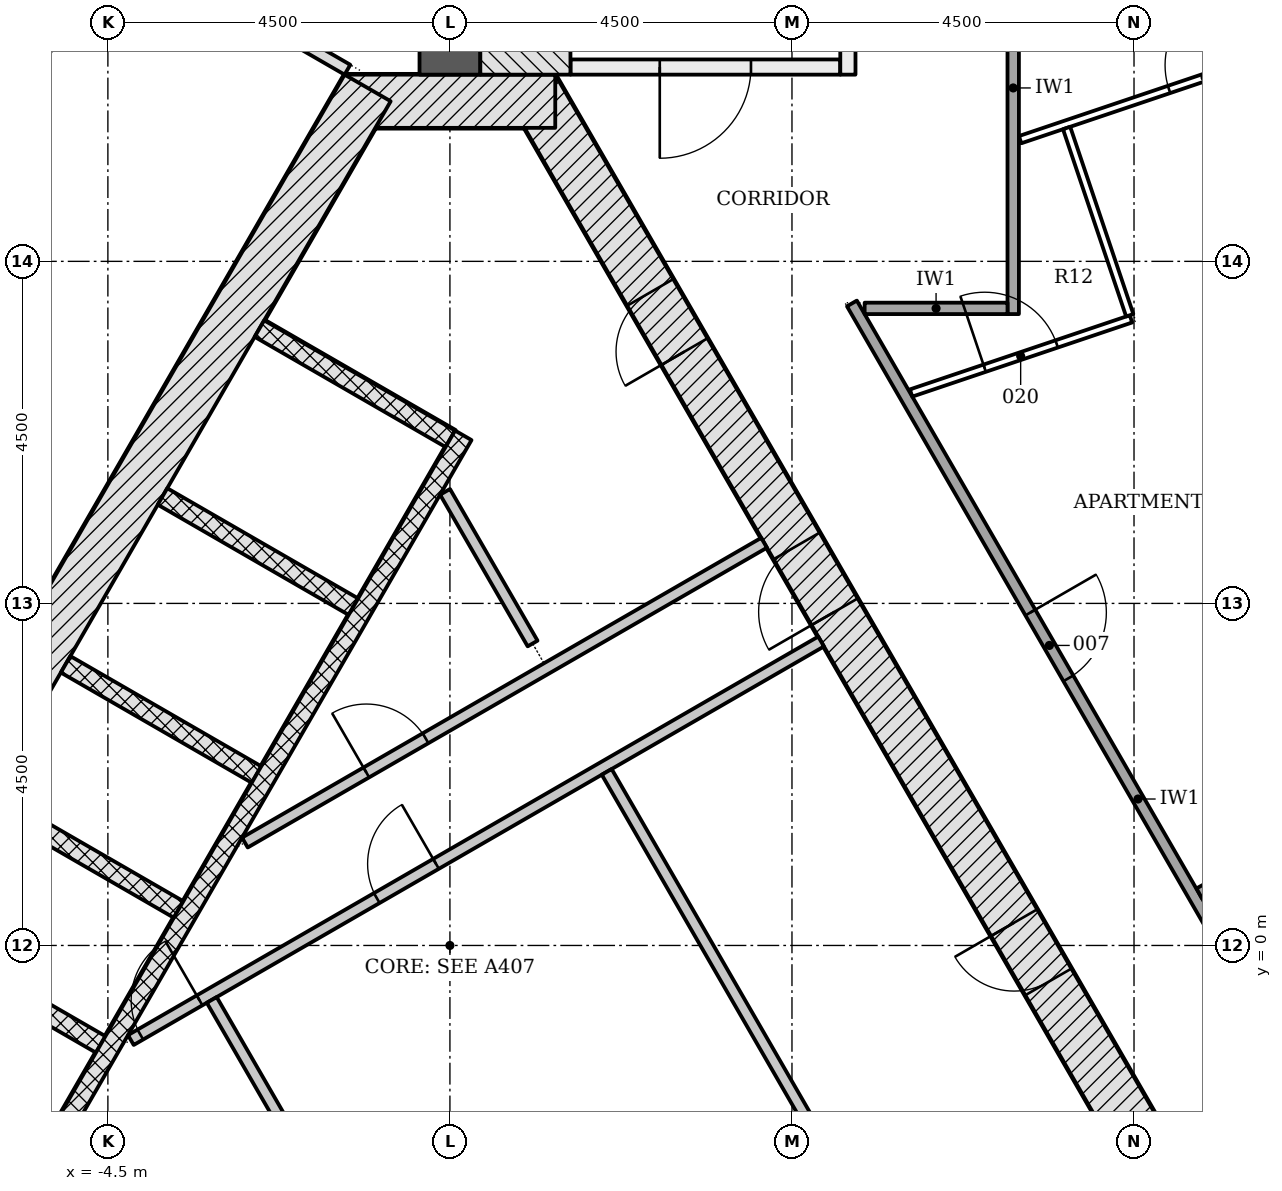
"""IFC4 building model, lengths in metres.
Left out: names, types, materials, properties, quantities, classifications, styles, units other than length and angle.
Written with IfcOpenShell. Run it as: python <this file> out.ifc"""

import sys

from ifc_helpers import new_model, si_unit, direction, frame, frame_2d, origin, place, context, subcontext, project, spatial, rectangle, extrude, element, fill, save


model = new_model("IFC4")
c1 = context("Model", 3, precision=1e-05, world=origin(), true_north=direction((0.0, 1.0)))
c2 = subcontext(c1, "Body", "Model", "MODEL_VIEW")
j1 = project(units=[si_unit("LENGTHUNIT", "METRE"), si_unit("PLANEANGLEUNIT", "RADIAN")], contexts=[c1])
p1 = place(None, origin())
s1 = spatial("IfcSite", under=j1, at=p1, CompositionType="ELEMENT")
p2 = place(p1, origin())
s2 = spatial("IfcBuilding", under=s1, at=p2, CompositionType="ELEMENT")
p3 = place(p2, frame((0.0, 0.0, 109.5)))
s3 = spatial("IfcBuildingStorey", under=s2, at=p3, CompositionType="ELEMENT", Elevation=109.5)
p4 = place(p3, frame((10.311, -4.703, -0.2), z_axis=(0.0, 0.0, 1.0), x_axis=(-0.500001446645, 0.866024568562, 0.0)))
e1 = element("IfcWall", 1, at=p4, inside=s3, PredefinedType="SHEAR", context=c2, shape_type="SweptSolid", body=[
    extrude(rectangle(XDim=18.458, YDim=0.7, at=frame_2d((9.229, 0.0))), origin(), (0.0, 0.0, 1.0), 3.6),
])
p5 = place(p4, frame((10.5, 0.0, 0.2)))
e2 = element("IfcOpeningElement", 2, at=p5, cuts=e1, PredefinedType="OPENING", context=c2, shape_type="SweptSolid", body=[
    extrude(rectangle(XDim=1.0, YDim=2.1, at=frame_2d((0.5, 1.05))), frame((0.0, 0.36, 0.0), z_axis=(0.0, -1.0, 0.0), x_axis=(1.0, 0.0, 0.0)), (0.0, 0.0, 1.0), 0.72),
])
p6 = place(p4, frame((4.877, 0.0, 0.2)))
e3 = element("IfcOpeningElement", 3, at=p6, cuts=e1, PredefinedType="OPENING", context=c2, shape_type="SweptSolid", body=[
    extrude(rectangle(XDim=0.9, YDim=2.1, at=frame_2d((0.45, 1.05))), frame((0.0, 0.36, 0.0), z_axis=(0.0, -1.0, 0.0), x_axis=(1.0, 0.0, 0.0)), (0.0, 0.0, 1.0), 0.72),
])
p7 = place(p4, frame((14.452, 0.0, 0.2)))
e4 = element("IfcOpeningElement", 4, at=p7, cuts=e1, PredefinedType="OPENING", context=c2, shape_type="SweptSolid", body=[
    extrude(rectangle(XDim=0.9, YDim=2.1, at=frame_2d((0.45, 1.05))), frame((0.0, 0.36, 0.0), z_axis=(0.0, -1.0, 0.0), x_axis=(1.0, 0.0, 0.0)), (0.0, 0.0, 1.0), 0.72),
])
p8 = place(p3, frame((1.386, 11.106, -0.2), z_axis=(0.0, 0.0, 1.0), x_axis=(-1.0, 0.0, 0.0)))
e5 = element("IfcWall", 5, at=p8, inside=s3, PredefinedType="SHEAR", context=c2, shape_type="SweptSolid", body=[
    extrude(rectangle(XDim=2.771, YDim=0.7, at=frame_2d((1.386, 0.0))), origin(), (0.0, 0.0, 1.0), 3.6),
])
p9 = place(p3, frame((-1.083, 11.281, -0.2), z_axis=(0.0, 0.0, 1.0), x_axis=(-0.500001446645, -0.866024568562, 0.0)))
e6 = element("IfcWall", 6, at=p9, inside=s3, PredefinedType="SHEAR", context=c2, shape_type="SweptSolid", body=[
    extrude(rectangle(XDim=18.458, YDim=0.7, at=frame_2d((9.229, 0.0))), origin(), (0.0, 0.0, 1.0), 3.6),
])
p10 = place(p9, frame((8.979, 0.0, 0.2)))
e7 = element("IfcOpeningElement", 7, at=p10, cuts=e6, PredefinedType="OPENING", context=c2, shape_type="SweptSolid", body=[
    extrude(rectangle(XDim=1.2, YDim=2.1, at=frame_2d((0.6, 1.05))), frame((0.0, 0.36, 0.0), z_axis=(0.0, -1.0, 0.0), x_axis=(1.0, 0.0, 0.0)), (0.0, 0.0, 1.0), 0.72),
])
p11 = place(p9, frame((11.029, 0.0, 0.2)))
e8 = element("IfcOpeningElement", 8, at=p11, cuts=e6, PredefinedType="OPENING", context=c2, shape_type="SweptSolid", body=[
    extrude(rectangle(XDim=1.2, YDim=2.1, at=frame_2d((0.6, 1.05))), frame((0.0, 0.36, 0.0), z_axis=(0.0, -1.0, 0.0), x_axis=(1.0, 0.0, 0.0)), (0.0, 0.0, 1.0), 0.72),
])
p12 = place(p3, frame((0.0, 11.456, -0.2), z_axis=(0.0, 0.0, 1.0), x_axis=(0.0, 1.0, 0.0)))
e9 = element("IfcWall", 9, at=p12, inside=s3, PredefinedType="SHEAR", context=c2, shape_type="SweptSolid", body=[
    extrude(rectangle(XDim=11.919, YDim=0.8, at=frame_2d((5.959, 0.0))), origin(), (0.0, 0.0, 1.0), 3.6),
])
p13 = place(p3, frame((-2.506, 8.115, -0.2), z_axis=(0.0, 0.0, 1.0), x_axis=(0.865996321171, -0.50005036918, 0.0)))
e10 = element("IfcWall", 10, at=p13, inside=s3, PredefinedType="PARTITIONING", context=c2, shape_type="SweptSolid", body=[
    extrude(rectangle(XDim=2.9, YDim=0.25, at=frame_2d((1.45, 0.0))), origin(), (0.0, 0.0, 1.0), 3.6),
])
for number, where, z_axis, x_axis in (
    (11, (-3.781, 5.907, -0.2), (0.0, 0.0, 1.0), (0.866, -0.5, 0.0)),
    (12, (-5.056, 3.699, -0.2), (0.0, 0.0, 1.0), (0.866, -0.5, 0.0)),
    (13, (-6.081, 1.923, -0.2), (0.0, 0.0, 1.0), (0.866, -0.5, 0.0)),
    (14, (-7.106, 0.148, -0.2), (0.0, 0.0, 1.0), (0.866, -0.5, 0.0)),
):
    element("IfcWall", number, at=place(p3, frame(where, z_axis=z_axis, x_axis=x_axis)), inside=s3, PredefinedType="PARTITIONING", context=c2, shape_type="SweptSolid", body=[
        extrude(rectangle(XDim=2.9, YDim=0.25, at=frame_2d((1.45, 0.0))), origin(), (0.0, 0.0, 1.0), 3.6),
    ])
p14 = place(p3, frame((0.176, 6.711, 0.0), z_axis=(0.0, 0.0, 1.0), x_axis=(-0.500004227369, -0.866022963098, 0.0)))
e15 = element("IfcWall", 15, at=p14, inside=s3, PredefinedType="PARTITIONING", context=c2, shape_type="SweptSolid", body=[
    extrude(rectangle(XDim=11.8, YDim=0.25, at=frame_2d((5.9, 0.0))), origin(), (0.0, 0.0, 1.0), 3.4),
])
p15 = place(p3, frame((-4.198, -1.244, 0.0), z_axis=(0.0, 0.0, 1.0), x_axis=(0.866020798945, 0.500007975732, 0.0)))
e16 = element("IfcWall", 16, at=p15, inside=s3, PredefinedType="PARTITIONING", context=c2, shape_type="SweptSolid", body=[
    extrude(rectangle(XDim=10.486, YDim=0.15, at=frame_2d((5.243, 0.0))), origin(), (0.0, 0.0, 1.0), 3.4),
])
p16 = place(p15, frame((3.736, 0.0, 0.0)))
e17 = element("IfcOpeningElement", 17, at=p16, cuts=e16, PredefinedType="OPENING", context=c2, shape_type="SweptSolid", body=[
    extrude(rectangle(XDim=0.9, YDim=2.1, at=frame_2d((0.45, 1.05))), frame((0.0, 0.085, 0.0), z_axis=(0.0, -1.0, 0.0), x_axis=(1.0, 0.0, 0.0)), (0.0, 0.0, 1.0), 0.17),
])
p17 = place(p15, frame((0.144, 0.0, 0.0)))
e18 = element("IfcOpeningElement", 18, at=p17, cuts=e16, PredefinedType="OPENING", context=c2, shape_type="SweptSolid", body=[
    extrude(rectangle(XDim=0.9, YDim=2.1, at=frame_2d((0.45, 1.05))), frame((0.0, 0.085, 0.0), z_axis=(0.0, -1.0, 0.0), x_axis=(1.0, 0.0, 0.0)), (0.0, 0.0, 1.0), 0.17),
])
p18 = place(p3, frame((5.367, -3.439, 0.0), z_axis=(0.0, 0.0, 1.0), x_axis=(-0.499981499682, 0.866036084685, 0.0)))
e19 = element("IfcWall", 19, at=p18, inside=s3, PredefinedType="PARTITIONING", context=c2, shape_type="SweptSolid", body=[
    extrude(rectangle(XDim=6.608, YDim=0.15, at=frame_2d((3.304, 0.0))), origin(), (0.0, 0.0, 1.0), 3.4),
])
p19 = place(p3, frame((-1.561, -3.439, 0.0), z_axis=(0.0, 0.0, 1.0), x_axis=(-0.499989077369, 0.866031709877, 0.0)))
e20 = element("IfcWall", 20, at=p19, inside=s3, PredefinedType="PARTITIONING", context=c2, shape_type="SweptSolid", body=[
    extrude(rectangle(XDim=3.144, YDim=0.15, at=frame_2d((1.572, 0.0))), origin(), (0.0, 0.0, 1.0), 3.4),
])
p20 = place(p3, frame((-2.698, 1.354, 0.0), z_axis=(0.0, 0.0, 1.0), x_axis=(0.866021157486, 0.500007354732, 0.0)))
e21 = element("IfcWall", 21, at=p20, inside=s3, PredefinedType="PARTITIONING", context=c2, shape_type="SweptSolid", body=[
    extrude(rectangle(XDim=7.888, YDim=0.15, at=frame_2d((3.944, 0.0))), origin(), (0.0, 0.0, 1.0), 3.4),
])
p21 = place(p20, frame((1.845, 0.0, 0.0)))
e22 = element("IfcOpeningElement", 22, at=p21, cuts=e21, PredefinedType="OPENING", context=c2, shape_type="SweptSolid", body=[
    extrude(rectangle(XDim=0.9, YDim=2.1, at=frame_2d((0.45, 1.05))), frame((0.0, 0.085, 0.0), z_axis=(0.0, -1.0, 0.0), x_axis=(1.0, 0.0, 0.0)), (0.0, 0.0, 1.0), 0.17),
])
p22 = place(p3, frame((1.088, 3.972, 0.0), z_axis=(0.0, 0.0, 1.0), x_axis=(-0.500116913307, 0.865957893332, 0.0)))
e23 = element("IfcWall", 23, at=p22, inside=s3, PredefinedType="PARTITIONING", context=c2, shape_type="SweptSolid", body=[
    extrude(rectangle(XDim=2.304, YDim=0.15, at=frame_2d((1.152, 0.0))), origin(), (0.0, 0.0, 1.0), 3.4),
])
p23 = place(p3, frame((5.135, 11.556, -0.2), z_axis=(0.0, 0.0, 1.0), x_axis=(-1.0, 0.0, 0.0)))
e24 = element("IfcWall", 24, at=p23, inside=s3, PredefinedType="SHEAR", context=c2, shape_type="SweptSolid", body=[
    extrude(rectangle(XDim=3.55, YDim=0.2, at=frame_2d((1.775, 0.0))), origin(), (0.0, 0.0, 1.0), 3.6),
])
p24 = place(p23, frame((1.175, 0.0, 0.2)))
e25 = element("IfcOpeningElement", 25, at=p24, cuts=e24, PredefinedType="OPENING", context=c2, shape_type="SweptSolid", body=[
    extrude(rectangle(XDim=1.2, YDim=2.1, at=frame_2d((0.6, 1.05))), frame((0.0, 0.11, 0.0), z_axis=(0.0, -1.0, 0.0), x_axis=(1.0, 0.0, 0.0)), (0.0, 0.0, 1.0), 0.22),
])
p25 = place(p3, frame((5.236, 11.456, -0.2), z_axis=(0.0, 0.0, 1.0), x_axis=(0.0, 1.0, 0.0)))
e26 = element("IfcWall", 26, at=p25, inside=s3, PredefinedType="SHEAR", context=c2, shape_type="SweptSolid", body=[
    extrude(rectangle(XDim=5.6, YDim=0.2, at=frame_2d((2.8, 0.0))), origin(), (0.0, 0.0, 1.0), 3.6),
])
p26 = place(p25, frame((0.45, 0.0, 0.2)))
e27 = element("IfcOpeningElement", 27, at=p26, cuts=e26, PredefinedType="OPENING", context=c2, shape_type="SweptSolid", body=[
    extrude(rectangle(XDim=1.2, YDim=2.1, at=frame_2d((0.6, 1.05))), frame((0.0, 0.11, 0.0), z_axis=(0.0, -1.0, 0.0), x_axis=(1.0, 0.0, 0.0)), (0.0, 0.0, 1.0), 0.22),
])
p27 = place(p3, frame((0.993, 11.456, -0.2), z_axis=(0.0, 0.0, 1.0), x_axis=(0.0, 1.0, 0.0)))
e28 = element("IfcWall", 28, at=p27, inside=s3, PredefinedType="SHEAR", context=c2, shape_type="SweptSolid", body=[
    extrude(rectangle(XDim=7.2, YDim=1.186, at=frame_2d((3.6, 0.0))), origin(), (0.0, 0.0, 1.0), 3.6),
])
p28 = place(p3, frame((-16.169, -3.099, 0.0), z_axis=(0.0, 0.0, 1.0), x_axis=(0.499999805269, 0.866025516212, 0.0)))
e29 = element("IfcWall", 29, at=p28, inside=s3, PredefinedType="PARTITIONING", context=c2, shape_type="SweptSolid", body=[
    extrude(rectangle(XDim=22.097, YDim=0.15, at=frame_2d((11.049, 0.0))), origin(), (0.0, 0.0, 1.0), 2.847),
])
p29 = place(p28, frame((17.776, 0.0, 0.0)))
e30 = element("IfcOpeningElement", 30, at=p29, cuts=e29, PredefinedType="OPENING", context=c2, shape_type="SweptSolid", body=[
    extrude(rectangle(XDim=1.0, YDim=2.1, at=frame_2d((0.5, 1.05))), frame((0.0, 0.085, 0.0), z_axis=(0.0, -1.0, 0.0), x_axis=(1.0, 0.0, 0.0)), (0.0, 0.0, 1.0), 0.17),
])
p30 = place(p28, frame((15.186, 0.0, 0.0)))
e31 = element("IfcOpeningElement", 31, at=p30, cuts=e29, PredefinedType="OPENING", context=c2, shape_type="SweptSolid", body=[
    extrude(rectangle(XDim=1.0, YDim=2.1, at=frame_2d((0.5, 1.05))), frame((0.0, 0.085, 0.0), z_axis=(0.0, -1.0, 0.0), x_axis=(1.0, 0.0, 0.0)), (0.0, 0.0, 1.0), 0.17),
])
p31 = place(p28, frame((11.84, 0.0, 0.0)))
e32 = element("IfcOpeningElement", 32, at=p31, cuts=e29, PredefinedType="OPENING", context=c2, shape_type="SweptSolid", body=[
    extrude(rectangle(XDim=1.5, YDim=2.1, at=frame_2d((0.75, 1.05))), frame((0.0, 0.085, 0.0), z_axis=(0.0, -1.0, 0.0), x_axis=(1.0, 0.0, 0.0)), (0.0, 0.0, 1.0), 0.17),
])
p32 = place(p28, frame((4.503, 0.0, 0.0)))
e33 = element("IfcOpeningElement", 33, at=p32, cuts=e29, PredefinedType="OPENING", context=c2, shape_type="SweptSolid", body=[
    extrude(rectangle(XDim=1.5, YDim=2.1, at=frame_2d((0.75, 1.05))), frame((0.0, 0.085, 0.0), z_axis=(0.0, -1.0, 0.0), x_axis=(1.0, 0.0, 0.0)), (0.0, 0.0, 1.0), 0.17),
])
p33 = place(p3, frame((-4.407, 13.374, 0.0), z_axis=(0.0, 0.0, 1.0), x_axis=(-0.499997181693, -0.866027030928, 0.0)))
e34 = element("IfcWall", 34, at=p33, inside=s3, PredefinedType="PARTITIONING", context=c2, shape_type="SweptSolid", body=[
    extrude(rectangle(XDim=16.77, YDim=0.15, at=frame_2d((8.385, 0.0))), origin(), (0.0, 0.0, 1.0), 2.847),
])
p34 = place(p33, frame((8.879, 0.0, 0.0)))
e35 = element("IfcOpeningElement", 35, at=p34, cuts=e34, PredefinedType="OPENING", context=c2, shape_type="SweptSolid", body=[
    extrude(rectangle(XDim=1.0, YDim=2.1, at=frame_2d((0.5, 1.05))), frame((0.0, 0.085, 0.0), z_axis=(0.0, -1.0, 0.0), x_axis=(1.0, 0.0, 0.0)), (0.0, 0.0, 1.0), 0.17),
])
p35 = place(p3, frame((5.289, 8.446, 0.0), z_axis=(0.0, 0.0, 1.0), x_axis=(0.499996620721, -0.866027354803, 0.0)))
e36 = element("IfcWall", 36, at=p35, inside=s3, PredefinedType="PARTITIONING", context=c2, shape_type="SweptSolid", body=[
    extrude(rectangle(XDim=15.057, YDim=0.15, at=frame_2d((7.528, 0.0))), origin(), (0.0, 0.0, 1.0), 2.847),
])
p36 = place(p35, frame((10.689, 0.0, 0.0)))
e37 = element("IfcOpeningElement", 37, at=p36, cuts=e36, PredefinedType="OPENING", context=c2, shape_type="SweptSolid", body=[
    extrude(rectangle(XDim=1.0, YDim=2.1, at=frame_2d((0.5, 1.05))), frame((0.0, 0.085, 0.0), z_axis=(0.0, -1.0, 0.0), x_axis=(1.0, 0.0, 0.0)), (0.0, 0.0, 1.0), 0.17),
])
p37 = place(p35, frame((4.695, 0.0, 0.0)))
e38 = element("IfcOpeningElement", 38, at=p37, cuts=e36, PredefinedType="OPENING", context=c2, shape_type="SweptSolid", body=[
    extrude(rectangle(XDim=1.0, YDim=2.1, at=frame_2d((0.5, 1.05))), frame((0.0, 0.085, 0.0), z_axis=(0.0, -1.0, 0.0), x_axis=(1.0, 0.0, 0.0)), (0.0, 0.0, 1.0), 0.17),
])
p38 = place(p3, frame((7.411, 8.306, 0.0), z_axis=(0.0, 0.0, 1.0), x_axis=(0.0, 1.0, 0.0)))
e39 = element("IfcWall", 39, at=p38, inside=s3, PredefinedType="PARTITIONING", context=c2, shape_type="SweptSolid", body=[
    extrude(rectangle(XDim=5.95, YDim=0.15, at=frame_2d((2.975, 0.0))), origin(), (0.0, 0.0, 1.0), 2.847),
])
p39 = place(p3, frame((-4.379, 13.271, 0.0), z_axis=(0.0, 0.0, 1.0), x_axis=(0.866019471182, -0.500010275428, 0.0)))
e40 = element("IfcWall", 40, at=p39, inside=s3, PredefinedType="PARTITIONING", context=c2, shape_type="SweptSolid", body=[
    extrude(rectangle(XDim=3.5, YDim=0.15, at=frame_2d((1.75, 0.0))), origin(), (0.0, 0.0, 1.0), 3.4),
])
p40 = place(p3, frame((5.456, 8.381, 0.0), z_axis=(0.0, 0.0, 1.0), x_axis=(1.0, 0.0, 0.0)))
e41 = element("IfcWall", 41, at=p40, inside=s3, PredefinedType="PARTITIONING", context=c2, shape_type="SweptSolid", body=[
    extrude(rectangle(XDim=1.88, YDim=0.15, at=frame_2d((0.94, 0.0))), origin(), (0.0, 0.0, 1.0), 2.847),
])
p41 = place(p3, frame((16.297, 4.232, 0.0), z_axis=(0.0, 0.0, 1.0), x_axis=(-0.875895262359, -0.482501284327, 0.0)))
e42 = element("IfcWall", 42, at=p41, inside=s3, PredefinedType="PARTITIONING", context=c2, shape_type="SweptSolid", body=[
    extrude(rectangle(XDim=7.351, YDim=0.15, at=frame_2d((3.676, 0.0))), origin(), (0.0, 0.0, 1.0), 2.847),
])
p42 = place(p3, frame((7.502, 10.601, 0.0), z_axis=(0.0, 0.0, 1.0), x_axis=(0.947570000993, 0.319548264303, 0.0)))
e43 = element("IfcWall", 43, at=p42, inside=s3, PredefinedType="PARTITIONING", context=c2, shape_type="SweptSolid", body=[
    extrude(rectangle(XDim=4.519, YDim=0.1, at=frame_2d((2.26, 0.0))), origin(), (0.0, 0.0, 1.0), 2.847),
])
p43 = place(p42, frame((2.068, 0.0, 0.0)))
e44 = element("IfcOpeningElement", 44, at=p43, cuts=e43, PredefinedType="OPENING", context=c2, shape_type="SweptSolid", body=[
    extrude(rectangle(XDim=1.0, YDim=2.1, at=frame_2d((0.5, 1.05))), frame((0.0, 0.06, 0.0), z_axis=(0.0, -1.0, 0.0), x_axis=(1.0, 0.0, 0.0)), (0.0, 0.0, 1.0), 0.12),
])
p44 = place(p3, frame((6.067, 7.268, 0.0), z_axis=(0.0, 0.0, 1.0), x_axis=(0.94756585242, 0.319560565978, 0.0)))
e45 = element("IfcWall", 45, at=p44, inside=s3, PredefinedType="PARTITIONING", context=c2, shape_type="SweptSolid", body=[
    extrude(rectangle(XDim=3.053, YDim=0.1, at=frame_2d((1.526, 0.0))), origin(), (0.0, 0.0, 1.0), 3.4),
])
p45 = place(p44, frame((1.021, 0.0, 0.0)))
e46 = element("IfcOpeningElement", 46, at=p45, cuts=e45, PredefinedType="OPENING", context=c2, shape_type="SweptSolid", body=[
    extrude(rectangle(XDim=1.0, YDim=2.1, at=frame_2d((0.5, 1.05))), frame((0.0, 0.06, 0.0), z_axis=(0.0, -1.0, 0.0), x_axis=(1.0, 0.0, 0.0)), (0.0, 0.0, 1.0), 0.12),
])
p46 = place(p3, frame((8.113, 10.754, 0.0), z_axis=(0.0, 0.0, 1.0), x_axis=(0.31954997077, -0.94756942552, 0.0)))
e47 = element("IfcWall", 47, at=p46, inside=s3, PredefinedType="PARTITIONING", context=c2, shape_type="SweptSolid", body=[
    extrude(rectangle(XDim=2.6, YDim=0.1, at=frame_2d((1.3, 0.0))), origin(), (0.0, 0.0, 1.0), 2.847),
])
p47 = place(p5, origin())
e48 = element("IfcDoor", 48, at=p47, inside=s3, OperationType="SINGLE_SWING_LEFT", PredefinedType="DOOR", context=c2, shape_type="SweptSolid", body=[
    extrude(rectangle(XDim=1.0, YDim=2.1, at=frame_2d((0.5, 1.05))), frame((0.0, 0.075, 0.0), z_axis=(0.0, -1.0, 0.0), x_axis=(1.0, 0.0, 0.0)), (0.0, 0.0, 1.0), 0.15),
])
fill(e2, e48)
p48 = place(p6, origin())
e49 = element("IfcDoor", 49, at=p48, inside=s3, OperationType="SINGLE_SWING_RIGHT", PredefinedType="DOOR", context=c2, shape_type="SweptSolid", body=[
    extrude(rectangle(XDim=0.9, YDim=2.1, at=frame_2d((0.45, 1.05))), frame((0.0, 0.075, 0.0), z_axis=(0.0, -1.0, 0.0), x_axis=(1.0, 0.0, 0.0)), (0.0, 0.0, 1.0), 0.15),
])
fill(e3, e49)
p49 = place(p7, origin())
e50 = element("IfcDoor", 50, at=p49, inside=s3, OperationType="SINGLE_SWING_LEFT", PredefinedType="DOOR", context=c2, shape_type="SweptSolid", body=[
    extrude(rectangle(XDim=0.9, YDim=2.1, at=frame_2d((0.45, 1.05))), frame((0.0, 0.075, 0.0), z_axis=(0.0, -1.0, 0.0), x_axis=(1.0, 0.0, 0.0)), (0.0, 0.0, 1.0), 0.15),
])
fill(e4, e50)
p50 = place(p16, origin())
e51 = element("IfcDoor", 51, at=p50, inside=s3, OperationType="SINGLE_SWING_RIGHT", PredefinedType="DOOR", context=c2, shape_type="SweptSolid", body=[
    extrude(rectangle(XDim=0.9, YDim=2.1, at=frame_2d((0.45, 1.05))), frame((0.0, 0.025, 0.0), z_axis=(0.0, -1.0, 0.0), x_axis=(1.0, 0.0, 0.0)), (0.0, 0.0, 1.0), 0.05),
])
fill(e17, e51)
p51 = place(p21, origin())
e52 = element("IfcDoor", 52, at=p51, inside=s3, OperationType="SINGLE_SWING_LEFT", PredefinedType="DOOR", context=c2, shape_type="SweptSolid", body=[
    extrude(rectangle(XDim=0.9, YDim=2.1, at=frame_2d((0.45, 1.05))), frame((0.0, 0.025, 0.0), z_axis=(0.0, -1.0, 0.0), x_axis=(1.0, 0.0, 0.0)), (0.0, 0.0, 1.0), 0.05),
])
fill(e22, e52)
p52 = place(p17, origin())
e53 = element("IfcDoor", 53, at=p52, inside=s3, OperationType="SINGLE_SWING_RIGHT", PredefinedType="DOOR", context=c2, shape_type="SweptSolid", body=[
    extrude(rectangle(XDim=0.9, YDim=2.1, at=frame_2d((0.45, 1.05))), frame((0.0, 0.025, 0.0), z_axis=(0.0, -1.0, 0.0), x_axis=(1.0, 0.0, 0.0)), (0.0, 0.0, 1.0), 0.05),
])
fill(e18, e53)
p53 = place(p24, origin())
e54 = element("IfcDoor", 54, at=p53, inside=s3, OperationType="SINGLE_SWING_RIGHT", PredefinedType="DOOR", context=c2, shape_type="SweptSolid", body=[
    extrude(rectangle(XDim=1.2, YDim=2.1, at=frame_2d((0.6, 1.05))), frame((0.0, 0.025, 0.0), z_axis=(0.0, -1.0, 0.0), x_axis=(1.0, 0.0, 0.0)), (0.0, 0.0, 1.0), 0.05),
])
fill(e25, e54)
p54 = place(p37, origin())
e55 = element("IfcDoor", 55, at=p54, inside=s3, OperationType="SINGLE_SWING_LEFT", PredefinedType="DOOR", context=c2, shape_type="SweptSolid", body=[
    extrude(rectangle(XDim=1.0, YDim=2.1, at=frame_2d((0.5, 1.05))), frame((0.0, 0.025, 0.0), z_axis=(0.0, -1.0, 0.0), x_axis=(1.0, 0.0, 0.0)), (0.0, 0.0, 1.0), 0.05),
])
fill(e38, e55)
p55 = place(p43, origin())
e56 = element("IfcDoor", 56, at=p55, inside=s3, OperationType="SINGLE_SWING_RIGHT", PredefinedType="DOOR", context=c2, shape_type="SweptSolid", body=[
    extrude(rectangle(XDim=1.0, YDim=2.1, at=frame_2d((0.5, 1.05))), frame((0.0, 0.025, 0.0), z_axis=(0.0, -1.0, 0.0), x_axis=(1.0, 0.0, 0.0)), (0.0, 0.0, 1.0), 0.05),
])
fill(e44, e56)
p56 = place(p45, origin())
e57 = element("IfcDoor", 57, at=p56, inside=s3, OperationType="SINGLE_SWING_LEFT", PredefinedType="DOOR", context=c2, shape_type="SweptSolid", body=[
    extrude(rectangle(XDim=1.0, YDim=2.1, at=frame_2d((0.5, 1.05))), frame((0.0, 0.025, 0.0), z_axis=(0.0, -1.0, 0.0), x_axis=(1.0, 0.0, 0.0)), (0.0, 0.0, 1.0), 0.05),
])
fill(e46, e57)
save(model, sys.argv[1])
